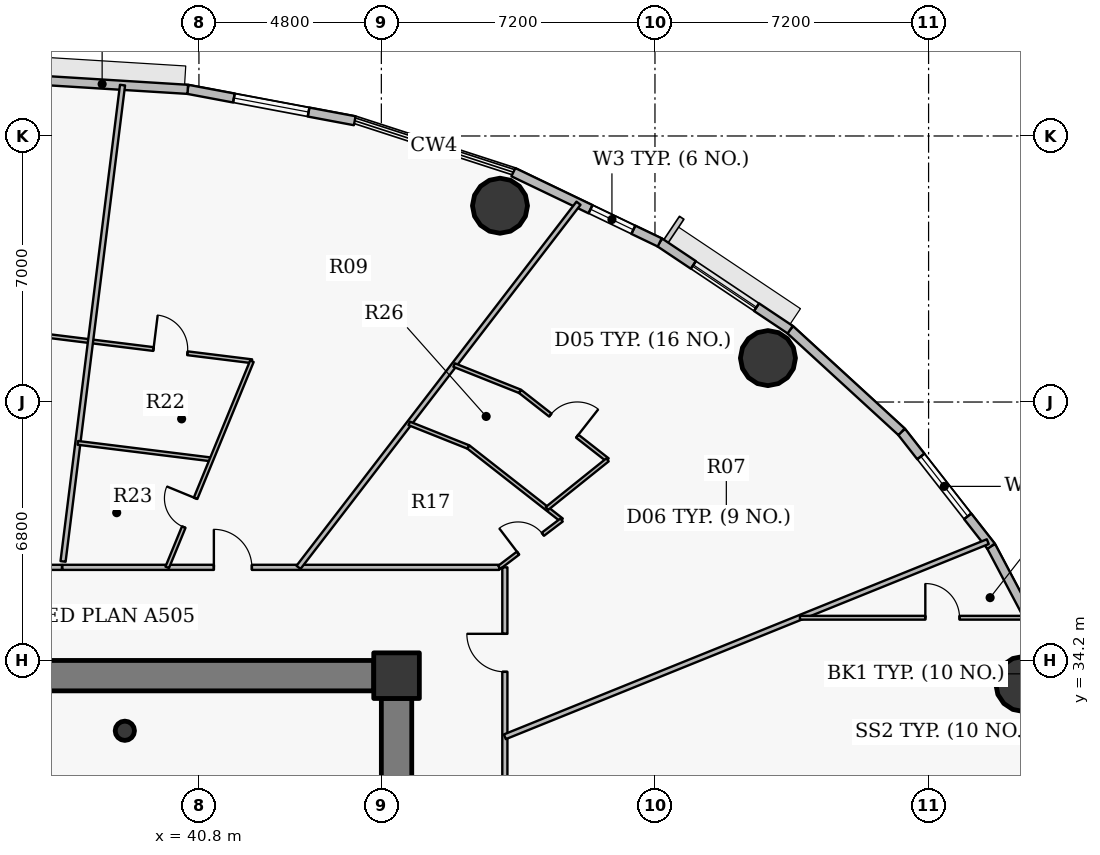
"""IFC4 building model, lengths in metres.
Left out: names, types, materials, properties, quantities, classifications, styles, units other than length and angle.
Written with IfcOpenShell. Run it as: python <this file> out.ifc"""

import sys

from ifc_helpers import new_model, si_unit, direction, frame, frame_2d, origin, origin_2d, place, context, subcontext, project, spatial, rectangle, hollow_circle, extrude, source, transform, mapped, element, fill, save


model = new_model("IFC4")
c1 = context("Model", 3, precision=1e-05, world=origin(), true_north=direction((0.0, 1.0)))
c2 = subcontext(c1, "Body", "Model", "MODEL_VIEW")
j1 = project(units=[si_unit("LENGTHUNIT", "METRE"), si_unit("PLANEANGLEUNIT", "RADIAN")], contexts=[c1])
p1 = place(None, origin())
s1 = spatial("IfcSite", under=j1, at=p1, CompositionType="ELEMENT")
p2 = place(p1, origin())
s2 = spatial("IfcBuilding", under=s1, at=p2, CompositionType="ELEMENT")
p3 = place(p2, frame((0.0, 0.0, 100.95)))
s3 = spatial("IfcBuildingStorey", under=s2, at=p3, CompositionType="ELEMENT", Elevation=100.95)
p4 = place(p3, frame((46.0, 33.8, 0.0), z_axis=(0.0, 0.0, 1.0), x_axis=(1.0, 0.0, 0.0)))
e1 = element("IfcColumn", 1, at=p4, inside=s3, PredefinedType="COLUMN", context=c2, shape_type="SweptSolid", body=[
    extrude(rectangle(XDim=1.2, YDim=1.2, at=origin_2d()), origin(), (0.0, 0.0, 1.0), 3.75),
])
p5 = place(p3, frame((38.85, 32.35, 0.0), z_axis=(0.0, 0.0, 1.0), x_axis=(1.0, 0.0, 0.0)))
e2 = element("IfcColumn", 2, at=p5, inside=s3, PredefinedType="COLUMN", context=c2, shape_type="SweptSolid", body=[
    extrude(hollow_circle(Radius=0.254, WallThickness=0.02, at=origin_2d()), origin(), (0.0, 0.0, 1.0), 3.75),
])
p6 = place(p3, frame((26.6, 33.8, 0.0), z_axis=(0.0, 0.0, 1.0), x_axis=(1.0, 0.0, 0.0)))
e3 = element("IfcWall", 3, at=p6, inside=s3, PredefinedType="SHEAR", context=c2, shape_type="SweptSolid", body=[
    extrude(rectangle(XDim=18.8, YDim=0.8, at=frame_2d((9.4, 0.0))), origin(), (0.0, 0.0, 1.0), 2.95),
])
p7 = place(p3, frame((46.0, 33.2, 0.0), z_axis=(0.0, 0.0, 1.0), x_axis=(0.0, -1.0, 0.0)))
e4 = element("IfcWall", 4, at=p7, inside=s3, PredefinedType="SHEAR", context=c2, shape_type="SweptSolid", body=[
    extrude(rectangle(XDim=12.4, YDim=0.8, at=frame_2d((6.2, 0.0))), origin(), (0.0, 0.0, 1.0), 2.95),
])
p8 = place(p7, frame((5.79, 0.0, 0.0)))
e5 = element("IfcOpeningElement", 5, at=p8, cuts=e4, PredefinedType="OPENING", context=c2, shape_type="SweptSolid", body=[
    extrude(rectangle(XDim=0.82, YDim=2.1, at=origin_2d()), frame((0.41, 0.41, 1.05), z_axis=(0.0, -1.0, 0.0), x_axis=(1.0, 0.0, 0.0)), (0.0, 0.0, 1.0), 0.82),
])
for number, where, z_axis, x_axis in (
    (6, (62.493, 33.581, 0.0), (0.0, 0.0, 1.0), (1.0, 0.0, 0.0)),
    (7, (55.773, 42.156, 0.0), (0.0, 0.0, 1.0), (1.0, 0.0, 0.0)),
    (8, (48.722, 46.165, 0.0), (0.0, 0.0, 1.0), (1.0, 0.0, 0.0)),
):
    element("IfcColumn", number, at=place(p3, frame(where, z_axis=z_axis, x_axis=x_axis)), inside=s3, PredefinedType="COLUMN", context=c2, shape_type="SweptSolid", body=[
        extrude(hollow_circle(Radius=0.725, WallThickness=0.042, at=origin_2d()), origin(), (0.0, 0.0, 1.0), 3.75),
    ])
p9 = place(p3, frame((61.645, 37.206, 0.0), z_axis=(0.0, 0.0, 1.0), x_axis=(0.467614004126, -0.883932770716, 0.0)))
e9 = element("IfcWall", 9, at=p9, inside=s3, PredefinedType="SOLIDWALL", context=c2, shape_type="SweptSolid", body=[
    extrude(rectangle(XDim=3.689, YDim=0.24, at=frame_2d((1.844, 0.0))), origin(), (0.0, 0.0, 1.0), 3.5),
])
p10 = place(p3, frame((59.289, 40.217, 0.0), z_axis=(0.0, 0.0, 1.0), x_axis=(0.616272103517, -0.787533297345, 0.0)))
e10 = element("IfcWall", 10, at=p10, inside=s3, PredefinedType="SOLIDWALL", context=c2, shape_type="SweptSolid", body=[
    extrude(rectangle(XDim=3.823, YDim=0.24, at=frame_2d((1.912, 0.0))), origin(), (0.0, 0.0, 1.0), 3.5),
])
p11 = place(p10, frame((0.824, 0.0, 0.9)))
e11 = element("IfcOpeningElement", 11, at=p11, cuts=e10, PredefinedType="OPENING", context=c2, shape_type="SweptSolid", body=[
    extrude(rectangle(XDim=2.0, YDim=1.75, at=origin_2d()), frame((1.0, 0.13, 0.875), z_axis=(0.0, -1.0, 0.0), x_axis=(1.0, 0.0, 0.0)), (0.0, 0.0, 1.0), 0.26),
])
p12 = place(p3, frame((56.358, 42.903, 0.0), z_axis=(0.0, 0.0, 1.0), x_axis=(0.737113356241, -0.675769117414, 0.0)))
e12 = element("IfcWall", 12, at=p12, inside=s3, PredefinedType="SOLIDWALL", context=c2, shape_type="SweptSolid", body=[
    extrude(rectangle(XDim=3.976, YDim=0.24, at=frame_2d((1.988, 0.0))), origin(), (0.0, 0.0, 1.0), 3.5),
])
p13 = place(p3, frame((52.925, 45.199, 0.0), z_axis=(0.0, 0.0, 1.0), x_axis=(0.831221811447, -0.555940914284, 0.0)))
e13 = element("IfcWall", 13, at=p13, inside=s3, PredefinedType="SOLIDWALL", context=c2, shape_type="SweptSolid", body=[
    extrude(rectangle(XDim=4.13, YDim=0.24, at=frame_2d((2.065, 0.0))), origin(), (0.0, 0.0, 1.0), 3.5),
])
p14 = place(p13, frame((1.065, 0.0, 0.9)))
e14 = element("IfcOpeningElement", 14, at=p14, cuts=e13, PredefinedType="OPENING", context=c2, shape_type="SweptSolid", body=[
    extrude(rectangle(XDim=2.0, YDim=1.75, at=origin_2d()), frame((1.0, 0.13, 0.875), z_axis=(0.0, -1.0, 0.0), x_axis=(1.0, 0.0, 0.0)), (0.0, 0.0, 1.0), 0.26),
])
p15 = place(p3, frame((49.074, 47.047, 0.0), z_axis=(0.0, 0.0, 1.0), x_axis=(0.901589935876, -0.432591709962, 0.0)))
e15 = element("IfcWall", 15, at=p15, inside=s3, PredefinedType="SOLIDWALL", context=c2, shape_type="SweptSolid", body=[
    extrude(rectangle(XDim=4.272, YDim=0.24, at=frame_2d((2.136, 0.0))), origin(), (0.0, 0.0, 1.0), 3.5),
])
p16 = place(p15, frame((2.252, 0.0, 0.9)))
e16 = element("IfcOpeningElement", 16, at=p16, cuts=e15, PredefinedType="OPENING", context=c2, shape_type="SweptSolid", body=[
    extrude(rectangle(XDim=1.25, YDim=1.65, at=origin_2d()), frame((0.625, 0.13, 0.825), z_axis=(0.0, -1.0, 0.0), x_axis=(1.0, 0.0, 0.0)), (0.0, 0.0, 1.0), 0.26),
])
p17 = place(p3, frame((40.506, 49.227, 0.0), z_axis=(0.0, 0.0, 1.0), x_axis=(0.982789252177, -0.184730305596, 0.0)))
e17 = element("IfcWall", 17, at=p17, inside=s3, PredefinedType="SOLIDWALL", context=c2, shape_type="SweptSolid", body=[
    extrude(rectangle(XDim=4.471, YDim=0.24, at=frame_2d((2.235, 0.0))), origin(), (0.0, 0.0, 1.0), 3.5),
])
p18 = place(p17, frame((1.236, 0.0, 0.9)))
e18 = element("IfcOpeningElement", 18, at=p18, cuts=e17, PredefinedType="OPENING", context=c2, shape_type="SweptSolid", body=[
    extrude(rectangle(XDim=2.0, YDim=1.75, at=origin_2d()), frame((1.0, 0.13, 0.875), z_axis=(0.0, -1.0, 0.0), x_axis=(1.0, 0.0, 0.0)), (0.0, 0.0, 1.0), 0.26),
])
p19 = place(p3, frame((36.0, 49.505, 0.0), z_axis=(0.0, 0.0, 1.0), x_axis=(0.998107531589, -0.061492726276, 0.0)))
e19 = element("IfcWall", 19, at=p19, inside=s3, PredefinedType="SOLIDWALL", context=c2, shape_type="SweptSolid", body=[
    extrude(rectangle(XDim=4.514, YDim=0.24, at=frame_2d((2.257, 0.0))), origin(), (0.0, 0.0, 1.0), 3.5),
])
p20 = place(p3, frame((36.0, 42.841, 0.0), z_axis=(0.0, 0.0, 1.0), x_axis=(0.992393593066, -0.123105468776, 0.0)))
e20 = element("IfcWall", 20, at=p20, inside=s3, PredefinedType="PARTITIONING", context=c2, shape_type="SweptSolid", body=[
    extrude(rectangle(XDim=6.241, YDim=0.1, at=frame_2d((3.121, 0.0))), origin(), (0.0, 0.0, 1.0), 2.935),
])
p21 = place(p20, frame((3.632, 0.0, 0.0)))
e21 = element("IfcOpeningElement", 21, at=p21, cuts=e20, PredefinedType="OPENING", context=c2, shape_type="SweptSolid", body=[
    extrude(rectangle(XDim=0.9, YDim=2.1, at=origin_2d()), frame((0.45, 0.06, 1.05), z_axis=(0.0, -1.0, 0.0), x_axis=(1.0, 0.0, 0.0)), (0.0, 0.0, 1.0), 0.12),
])
p22 = place(p3, frame((37.205, 36.65, 0.0), z_axis=(0.0, 0.0, 1.0), x_axis=(1.0, 0.0, 0.0)))
e22 = element("IfcWall", 22, at=p22, inside=s3, PredefinedType="PARTITIONING", context=c2, shape_type="SweptSolid", body=[
    extrude(rectangle(XDim=11.499, YDim=0.135, at=frame_2d((5.75, 0.0))), origin(), (0.0, 0.0, 1.0), 2.935),
])
p23 = place(p22, frame((3.988, 0.0, 0.0)))
e23 = element("IfcOpeningElement", 23, at=p23, cuts=e22, PredefinedType="OPENING", context=c2, shape_type="SweptSolid", body=[
    extrude(rectangle(XDim=1.0, YDim=2.15, at=origin_2d()), frame((0.5, 0.078, 1.075), z_axis=(0.0, -1.0, 0.0), x_axis=(1.0, 0.0, 0.0)), (0.0, 0.0, 1.0), 0.155),
])
p24 = place(p3, frame((37.224, 36.805, 0.0), z_axis=(0.0, 0.0, 1.0), x_axis=(0.123906262398, 0.992293927291, 0.0)))
e24 = element("IfcWall", 24, at=p24, inside=s3, PredefinedType="PARTITIONING", context=c2, shape_type="SweptSolid", body=[
    extrude(rectangle(XDim=12.63, YDim=0.135, at=frame_2d((6.315, 0.0))), origin(), (0.0, 0.0, 1.0), 2.935),
])
p25 = place(p3, frame((37.614, 39.925, 0.0), z_axis=(0.0, 0.0, 1.0), x_axis=(0.992397148182, -0.123076806427, 0.0)))
e25 = element("IfcWall", 25, at=p25, inside=s3, PredefinedType="PARTITIONING", context=c2, shape_type="SweptSolid", body=[
    extrude(rectangle(XDim=3.545, YDim=0.1, at=frame_2d((1.772, 0.0))), origin(), (0.0, 0.0, 1.0), 3.5),
])
p26 = place(p3, frame((39.965, 36.65, 0.0), z_axis=(0.0, 0.0, 1.0), x_axis=(0.380069011115, 0.924958132452, 0.0)))
e26 = element("IfcWall", 26, at=p26, inside=s3, PredefinedType="PARTITIONING", context=c2, shape_type="SweptSolid", body=[
    extrude(rectangle(XDim=5.863, YDim=0.1, at=frame_2d((2.931, 0.0))), origin(), (0.0, 0.0, 1.0), 3.5),
])
p27 = place(p26, frame((1.145, 0.0, 0.0)))
e27 = element("IfcOpeningElement", 27, at=p27, cuts=e26, PredefinedType="OPENING", context=c2, shape_type="SweptSolid", body=[
    extrude(rectangle(XDim=0.82, YDim=2.1, at=origin_2d()), frame((0.41, 0.06, 1.05), z_axis=(0.0, -1.0, 0.0), x_axis=(1.0, 0.0, 0.0)), (0.0, 0.0, 1.0), 0.12),
])
p28 = place(p3, frame((43.42, 36.65, 0.0), z_axis=(0.0, 0.0, 1.0), x_axis=(0.609572126114, 0.792730611913, 0.0)))
e28 = element("IfcWall", 28, at=p28, inside=s3, PredefinedType="PARTITIONING", context=c2, shape_type="SweptSolid", body=[
    extrude(rectangle(XDim=12.086, YDim=0.135, at=frame_2d((6.043, 0.0))), origin(), (0.0, 0.0, 1.0), 2.935),
])
p29 = place(p3, frame((46.333, 40.437, 0.0), z_axis=(0.0, 0.0, 1.0), x_axis=(0.928817558248, -0.370537371247, 0.0)))
e29 = element("IfcWall", 29, at=p29, inside=s3, PredefinedType="PARTITIONING", context=c2, shape_type="SweptSolid", body=[
    extrude(rectangle(XDim=1.677, YDim=0.1, at=frame_2d((0.839, 0.0))), origin(), (0.0, 0.0, 1.0), 3.035),
])
p30 = place(p3, frame((47.514, 41.973, 0.0), z_axis=(0.0, 0.0, 1.0), x_axis=(0.928809612726, -0.370557287485, 0.0)))
e30 = element("IfcWall", 30, at=p30, inside=s3, PredefinedType="PARTITIONING", context=c2, shape_type="SweptSolid", body=[
    extrude(rectangle(XDim=1.869, YDim=0.1, at=frame_2d((0.935, 0.0))), origin(), (0.0, 0.0, 1.0), 3.5),
])
p31 = place(p3, frame((47.891, 39.816, 0.0), z_axis=(0.0, 0.0, 1.0), x_axis=(0.787339621997, -0.616519520887, 0.0)))
e31 = element("IfcWall", 31, at=p31, inside=s3, PredefinedType="PARTITIONING", context=c2, shape_type="SweptSolid", body=[
    extrude(rectangle(XDim=3.116, YDim=0.1, at=frame_2d((1.558, 0.0))), origin(), (0.0, 0.0, 1.0), 2.935),
])
p32 = place(p3, frame((48.704, 36.65, 0.0), z_axis=(0.0, 0.0, 1.0), x_axis=(0.796299280247, 0.604902848628, 0.0)))
e32 = element("IfcWall", 32, at=p32, inside=s3, PredefinedType="PARTITIONING", context=c2, shape_type="SweptSolid", body=[
    extrude(rectangle(XDim=2.059, YDim=0.1, at=frame_2d((1.029, 0.0))), origin(), (0.0, 0.0, 1.0), 2.935),
])
p33 = place(p32, frame((0.619, 0.0, 0.0)))
e33 = element("IfcOpeningElement", 33, at=p33, cuts=e32, PredefinedType="OPENING", context=c2, shape_type="SweptSolid", body=[
    extrude(rectangle(XDim=0.82, YDim=2.1, at=origin_2d()), frame((0.41, 0.06, 1.05), z_axis=(0.0, -1.0, 0.0), x_axis=(1.0, 0.0, 0.0)), (0.0, 0.0, 1.0), 0.12),
])
p34 = place(p3, frame((48.85, 17.35, 0.0), z_axis=(0.0, 0.0, 1.0), x_axis=(0.0, 1.0, 0.0)))
e34 = element("IfcWall", 34, at=p34, inside=s3, PredefinedType="PARTITIONING", context=c2, shape_type="SweptSolid", body=[
    extrude(rectangle(XDim=19.3, YDim=0.135, at=frame_2d((9.65, 0.0))), origin(), (0.0, 0.0, 1.0), 2.935),
])
p35 = place(p34, frame((16.551, 0.0, 0.0)))
e35 = element("IfcOpeningElement", 35, at=p35, cuts=e34, PredefinedType="OPENING", context=c2, shape_type="SweptSolid", body=[
    extrude(rectangle(XDim=1.0, YDim=2.15, at=origin_2d()), frame((0.5, 0.078, 1.075), z_axis=(0.0, -1.0, 0.0), x_axis=(1.0, 0.0, 0.0)), (0.0, 0.0, 1.0), 0.155),
])
p36 = place(p34, frame((8.753, 0.0, 0.0)))
e36 = element("IfcOpeningElement", 36, at=p36, cuts=e34, PredefinedType="OPENING", context=c2, shape_type="SweptSolid", body=[
    extrude(rectangle(XDim=1.0, YDim=2.15, at=origin_2d()), frame((0.5, 0.078, 1.075), z_axis=(0.0, -1.0, 0.0), x_axis=(1.0, 0.0, 0.0)), (0.0, 0.0, 1.0), 0.155),
])
p37 = place(p3, frame((48.85, 32.192, 0.0), z_axis=(0.0, 0.0, 1.0), x_axis=(0.927181163505, 0.374613253958, 0.0)))
e37 = element("IfcWall", 37, at=p37, inside=s3, PredefinedType="PARTITIONING", context=c2, shape_type="SweptSolid", body=[
    extrude(rectangle(XDim=13.706, YDim=0.135, at=frame_2d((6.853, 0.0))), origin(), (0.0, 0.0, 1.0), 2.935),
])
p38 = place(p3, frame((49.25, 41.28, 0.0), z_axis=(0.0, 0.0, 1.0), x_axis=(0.787360471536, -0.616492893602, 0.0)))
e38 = element("IfcWall", 38, at=p38, inside=s3, PredefinedType="PARTITIONING", context=c2, shape_type="SweptSolid", body=[
    extrude(rectangle(XDim=2.923, YDim=0.1, at=frame_2d((1.462, 0.0))), origin(), (0.0, 0.0, 1.0), 3.5),
])
p39 = place(p38, frame((1.012, 0.0, 0.0)))
e39 = element("IfcOpeningElement", 39, at=p39, cuts=e38, PredefinedType="OPENING", context=c2, shape_type="SweptSolid", body=[
    extrude(rectangle(XDim=0.9, YDim=2.1, at=origin_2d()), frame((0.45, 0.06, 1.05), z_axis=(0.0, -1.0, 0.0), x_axis=(1.0, 0.0, 0.0)), (0.0, 0.0, 1.0), 0.12),
])
p40 = place(p3, frame((49.956, 38.198, 0.0), z_axis=(0.0, 0.0, 1.0), x_axis=(0.78000622602, 0.625771753413, 0.0)))
e40 = element("IfcWall", 40, at=p40, inside=s3, PredefinedType="PARTITIONING", context=c2, shape_type="SweptSolid", body=[
    extrude(rectangle(XDim=2.045, YDim=0.1, at=frame_2d((1.022, 0.0))), origin(), (0.0, 0.0, 1.0), 3.035),
])
p41 = place(p3, frame((56.615, 35.324, 0.0), z_axis=(0.0, 0.0, 1.0), x_axis=(1.0, 0.0, 0.0)))
e41 = element("IfcWall", 41, at=p41, inside=s3, PredefinedType="PARTITIONING", context=c2, shape_type="SweptSolid", body=[
    extrude(rectangle(XDim=6.031, YDim=0.1, at=frame_2d((3.016, 0.0))), origin(), (0.0, 0.0, 1.0), 2.935),
])
p42 = place(p41, frame((3.3, 0.0, 0.0)))
e42 = element("IfcOpeningElement", 42, at=p42, cuts=e41, PredefinedType="OPENING", context=c2, shape_type="SweptSolid", body=[
    extrude(rectangle(XDim=0.9, YDim=2.1, at=origin_2d()), frame((0.45, 0.06, 1.05), z_axis=(0.0, -1.0, 0.0), x_axis=(1.0, 0.0, 0.0)), (0.0, 0.0, 1.0), 0.12),
])
p43 = place(p3, frame((33.533, 36.65, 0.0), z_axis=(0.0, 0.0, 1.0), x_axis=(1.0, 0.0, 0.0)))
e43 = element("IfcWall", 43, at=p43, inside=s3, PredefinedType="PARTITIONING", context=c2, shape_type="SweptSolid", body=[
    extrude(rectangle(XDim=3.662, YDim=0.135, at=frame_2d((1.831, 0.0))), origin(), (0.0, 0.0, 1.0), 2.935),
])
p44 = place(p3, frame((46.4, 34.2, 0.0), z_axis=(0.0, 0.0, 1.0), x_axis=(-1.0, 0.0, 0.0)))
e44 = element("IfcWall", 44, at=p44, inside=s3, PredefinedType="PARTITIONING", context=c2, shape_type="SweptSolid", body=[
    extrude(rectangle(XDim=0.99, YDim=0.135, at=frame_2d((0.495, 0.0))), origin(), (0.0, 0.0, 1.0), 2.935),
])
p45 = place(p3, frame((46.4, 33.21, 0.0), z_axis=(0.0, 0.0, 1.0), x_axis=(0.0, 1.0, 0.0)))
e45 = element("IfcWall", 45, at=p45, inside=s3, PredefinedType="PARTITIONING", context=c2, shape_type="SweptSolid", body=[
    extrude(rectangle(XDim=0.683, YDim=0.135, at=frame_2d((0.341, 0.0))), origin(), (0.0, 0.0, 1.0), 3.5),
])
m1 = source(origin(), c2, "Body", "SweptSolid", [
    extrude(rectangle(XDim=2.0, YDim=1.75, at=origin_2d()), frame((1.0, 0.03, 0.875), z_axis=(0.0, -1.0, 0.0), x_axis=(1.0, 0.0, 0.0)), (0.0, 0.0, 1.0), 0.06),
])
p46 = place(p11, origin())
e46 = element("IfcWindow", 46, at=p46, inside=s3, PartitioningType="DOUBLE_PANEL_VERTICAL", PredefinedType="WINDOW", context=c2, shape_type="MappedRepresentation", body=[
    mapped(m1, transform((0.0, 0.0, 0.0), x_axis=(1.0, 0.0, 0.0), y_axis=(0.0, 1.0, 0.0), z_axis=(0.0, 0.0, 1.0), scale=1.0)),
])
fill(e11, e46)
p47 = place(p14, origin())
e47 = element("IfcWindow", 47, at=p47, inside=s3, PartitioningType="DOUBLE_PANEL_VERTICAL", PredefinedType="WINDOW", context=c2, shape_type="MappedRepresentation", body=[
    mapped(m1, transform((0.0, 0.0, 0.0), x_axis=(1.0, 0.0, 0.0), y_axis=(0.0, 1.0, 0.0), z_axis=(0.0, 0.0, 1.0), scale=1.0)),
])
fill(e14, e47)
m2 = source(origin(), c2, "Body", "SweptSolid", [
    extrude(rectangle(XDim=1.25, YDim=1.65, at=origin_2d()), frame((0.625, 0.03, 0.825), z_axis=(0.0, -1.0, 0.0), x_axis=(1.0, 0.0, 0.0)), (0.0, 0.0, 1.0), 0.06),
])
p48 = place(p16, origin())
e48 = element("IfcWindow", 48, at=p48, inside=s3, PartitioningType="SINGLE_PANEL", PredefinedType="WINDOW", context=c2, shape_type="MappedRepresentation", body=[
    mapped(m2, transform((0.0, 0.0, 0.0), x_axis=(1.0, 0.0, 0.0), y_axis=(0.0, 1.0, 0.0), z_axis=(0.0, 0.0, 1.0), scale=1.0)),
])
fill(e16, e48)
p49 = place(p18, origin())
e49 = element("IfcWindow", 49, at=p49, inside=s3, PartitioningType="DOUBLE_PANEL_VERTICAL", PredefinedType="WINDOW", context=c2, shape_type="MappedRepresentation", body=[
    mapped(m1, transform((0.0, 0.0, 0.0), x_axis=(1.0, 0.0, 0.0), y_axis=(0.0, 1.0, 0.0), z_axis=(0.0, 0.0, 1.0), scale=1.0)),
])
fill(e18, e49)
m3 = source(origin(), c2, "Body", "SweptSolid", [
    extrude(rectangle(XDim=1.0, YDim=2.15, at=origin_2d()), frame((0.5, 0.025, 1.075), z_axis=(0.0, -1.0, 0.0), x_axis=(1.0, 0.0, 0.0)), (0.0, 0.0, 1.0), 0.05),
])
p50 = place(p35, origin())
e50 = element("IfcDoor", 50, at=p50, inside=s3, OperationType="SINGLE_SWING_RIGHT", PredefinedType="DOOR", context=c2, shape_type="MappedRepresentation", body=[
    mapped(m3, transform((0.0, 0.0, 0.0), x_axis=(1.0, 0.0, 0.0), y_axis=(0.0, 1.0, 0.0), z_axis=(0.0, 0.0, 1.0), scale=1.0)),
])
fill(e35, e50)
m4 = source(origin(), c2, "Body", "SweptSolid", [
    extrude(rectangle(XDim=0.82, YDim=2.1, at=origin_2d()), frame((0.41, 0.025, 1.05), z_axis=(0.0, -1.0, 0.0), x_axis=(1.0, 0.0, 0.0)), (0.0, 0.0, 1.0), 0.05),
])
p51 = place(p33, origin())
e51 = element("IfcDoor", 51, at=p51, inside=s3, OperationType="SINGLE_SWING_LEFT", PredefinedType="DOOR", context=c2, shape_type="MappedRepresentation", body=[
    mapped(m4, transform((0.0, 0.0, 0.0), x_axis=(1.0, 0.0, 0.0), y_axis=(0.0, 1.0, 0.0), z_axis=(0.0, 0.0, 1.0), scale=1.0)),
])
fill(e33, e51)
m5 = source(origin(), c2, "Body", "SweptSolid", [
    extrude(rectangle(XDim=0.9, YDim=2.1, at=origin_2d()), frame((0.45, 0.025, 1.05), z_axis=(0.0, -1.0, 0.0), x_axis=(1.0, 0.0, 0.0)), (0.0, 0.0, 1.0), 0.05),
])
p52 = place(p39, origin())
e52 = element("IfcDoor", 52, at=p52, inside=s3, OperationType="SINGLE_SWING_RIGHT", PredefinedType="DOOR", context=c2, shape_type="MappedRepresentation", body=[
    mapped(m5, transform((0.0, 0.0, 0.0), x_axis=(1.0, 0.0, 0.0), y_axis=(0.0, 1.0, 0.0), z_axis=(0.0, 0.0, 1.0), scale=1.0)),
])
fill(e39, e52)
p53 = place(p23, origin())
e53 = element("IfcDoor", 53, at=p53, inside=s3, OperationType="SINGLE_SWING_LEFT", PredefinedType="DOOR", context=c2, shape_type="MappedRepresentation", body=[
    mapped(m3, transform((0.0, 0.0, 0.0), x_axis=(1.0, 0.0, 0.0), y_axis=(0.0, 1.0, 0.0), z_axis=(0.0, 0.0, 1.0), scale=1.0)),
])
fill(e23, e53)
p54 = place(p27, origin())
e54 = element("IfcDoor", 54, at=p54, inside=s3, OperationType="SINGLE_SWING_RIGHT", PredefinedType="DOOR", context=c2, shape_type="MappedRepresentation", body=[
    mapped(m4, transform((0.0, 0.0, 0.0), x_axis=(1.0, 0.0, 0.0), y_axis=(0.0, 1.0, 0.0), z_axis=(0.0, 0.0, 1.0), scale=1.0)),
])
fill(e27, e54)
p55 = place(p21, origin())
e55 = element("IfcDoor", 55, at=p55, inside=s3, OperationType="SINGLE_SWING_LEFT", PredefinedType="DOOR", context=c2, shape_type="MappedRepresentation", body=[
    mapped(m5, transform((0.0, 0.0, 0.0), x_axis=(1.0, 0.0, 0.0), y_axis=(0.0, 1.0, 0.0), z_axis=(0.0, 0.0, 1.0), scale=1.0)),
])
fill(e21, e55)
p56 = place(p42, origin())
e56 = element("IfcDoor", 56, at=p56, inside=s3, OperationType="SINGLE_SWING_LEFT", PredefinedType="DOOR", context=c2, shape_type="MappedRepresentation", body=[
    mapped(m5, transform((0.0, 0.0, 0.0), x_axis=(1.0, 0.0, 0.0), y_axis=(0.0, 1.0, 0.0), z_axis=(0.0, 0.0, 1.0), scale=1.0)),
])
fill(e42, e56)
save(model, sys.argv[1])
